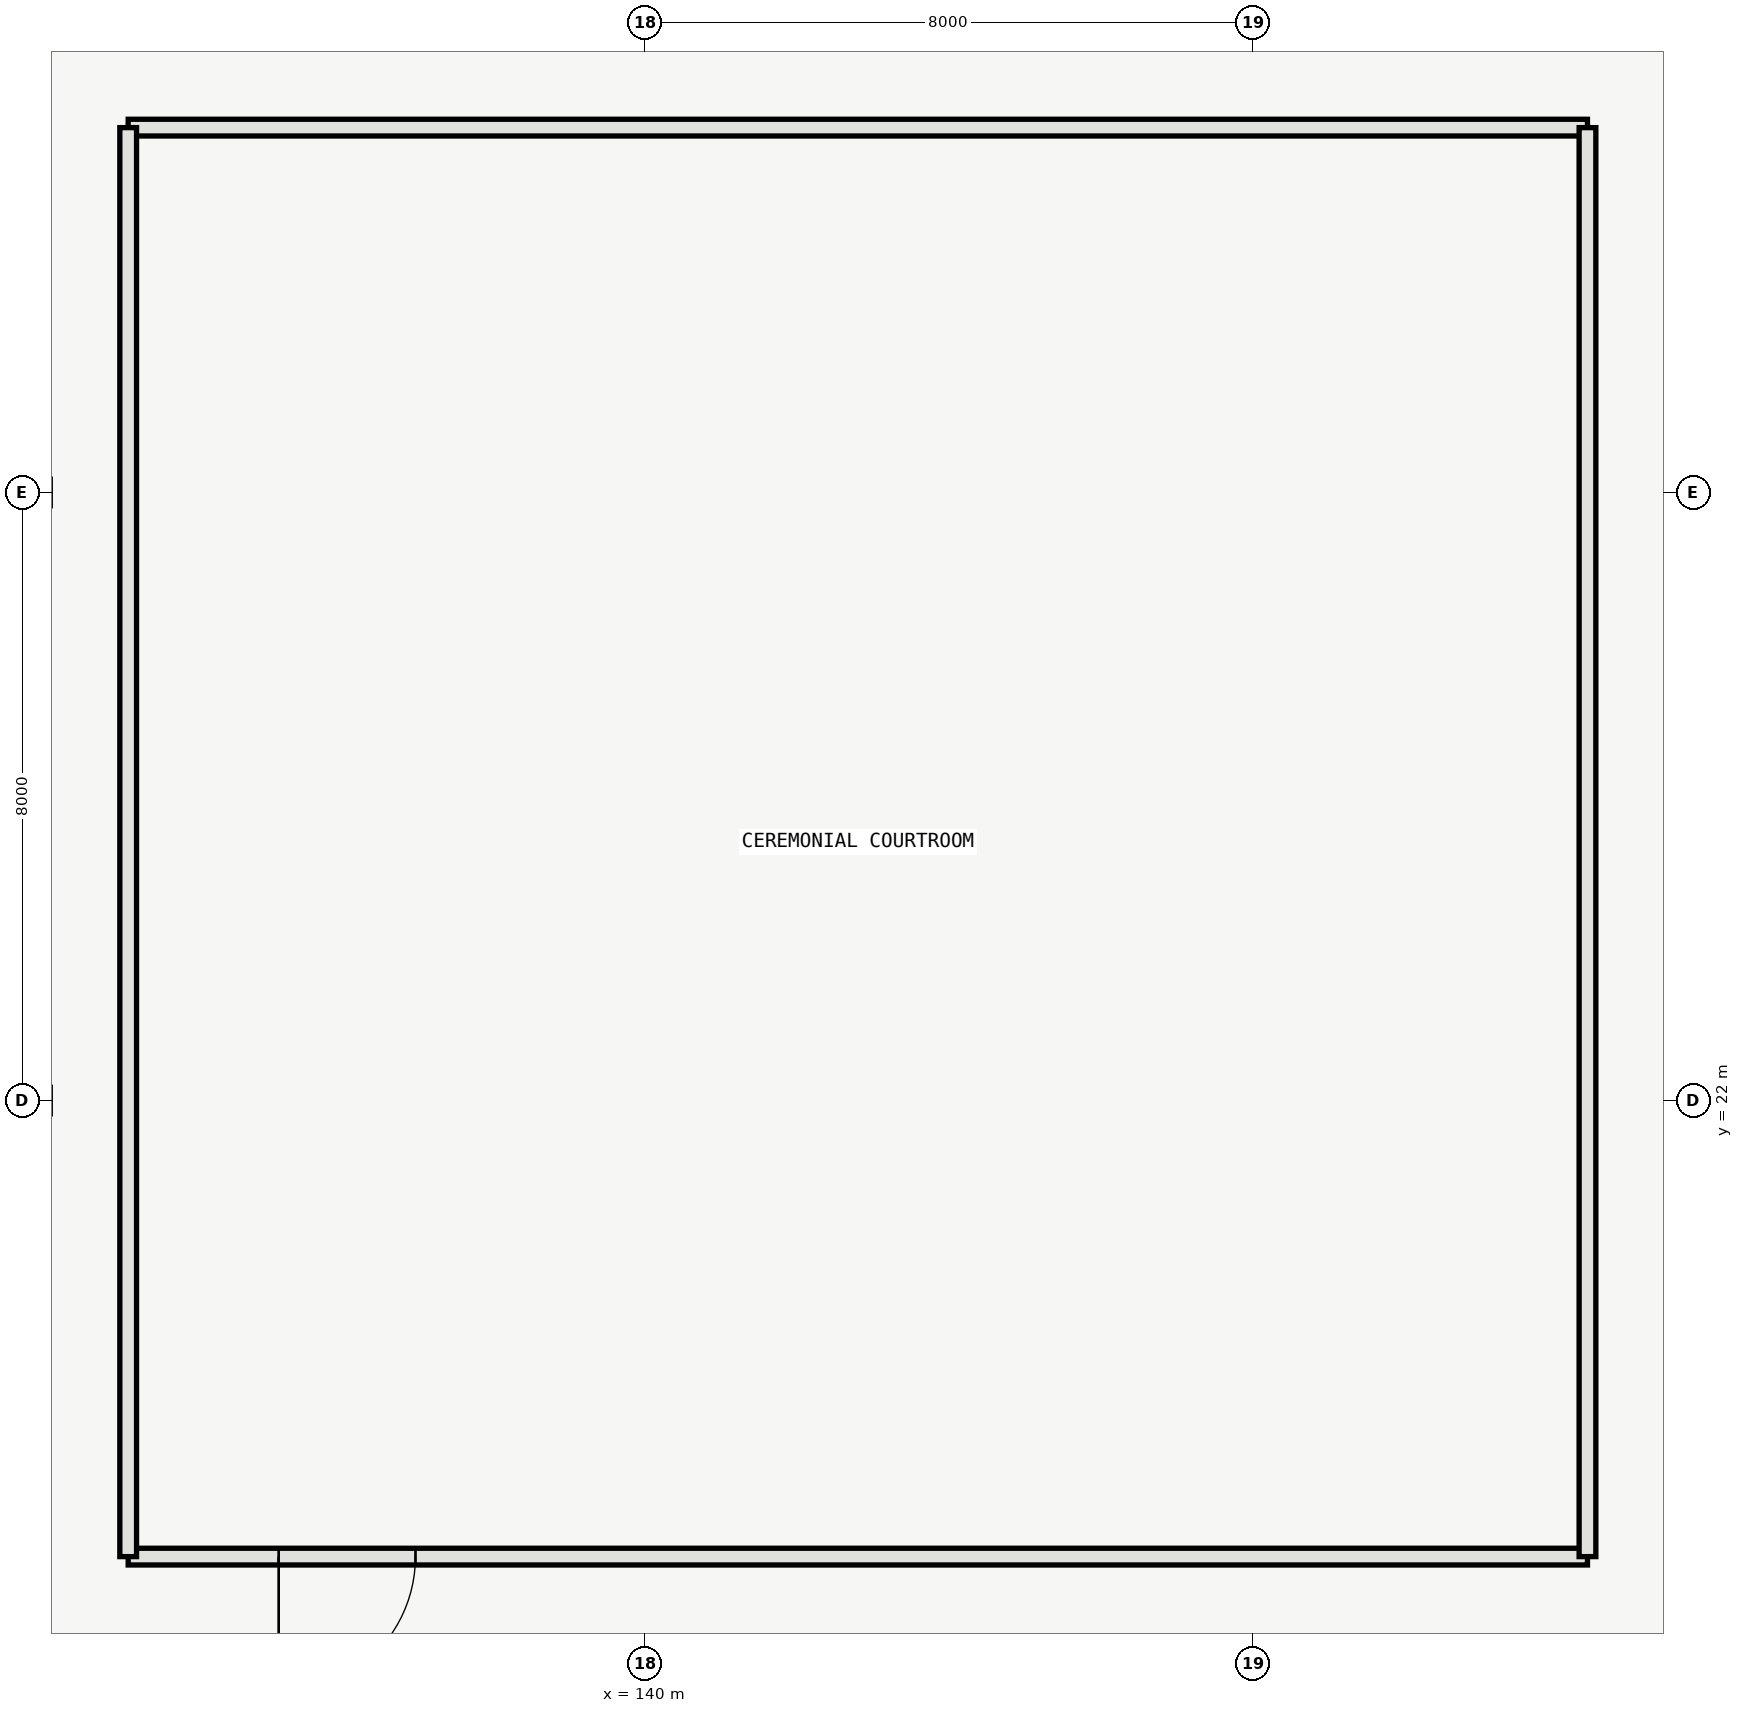
"""IFC4 building model, lengths in metres.
Left out: names, types, materials, properties, quantities, classifications, styles, units other than length and angle.
Written with IfcOpenShell. Run it as: python <this file> out.ifc"""

import sys

from ifc_helpers import new_model, si_unit, direction, frame, frame_2d, origin, place, context, subcontext, project, spatial, rectangle, extrude, element, fill, save


model = new_model("IFC4")
c1 = context("Model", 3, precision=1e-05, world=origin(), true_north=direction((0.0, 1.0)))
c2 = subcontext(c1, "Body", "Model", "MODEL_VIEW")
j1 = project(units=[si_unit("LENGTHUNIT", "METRE"), si_unit("PLANEANGLEUNIT", "RADIAN")], contexts=[c1])
p1 = place(None, origin())
s1 = spatial("IfcSite", under=j1, at=p1, CompositionType="ELEMENT")
p2 = place(p1, origin())
s2 = spatial("IfcBuilding", under=s1, at=p2, CompositionType="ELEMENT")
p3 = place(p2, origin())
s3 = spatial("IfcBuildingStorey", under=s2, at=p3, CompositionType="ELEMENT", Elevation=0.0)
p4 = place(p3, frame((133.2, 16.0, 0.0), z_axis=(0.0, 0.0, 1.0), x_axis=(1.0, 0.0, 0.0)))
e1 = element("IfcWall", 1, at=p4, inside=s3, PredefinedType="PARTITIONING", context=c2, shape_type="SweptSolid", body=[
    extrude(rectangle(XDim=19.2, YDim=0.22, at=frame_2d((9.6, 0.0))), origin(), (0.0, 0.0, 1.0), 5.12),
])
p5 = place(p4, frame((1.98, 0.0, 0.0)))
e2 = element("IfcOpeningElement", 2, at=p5, cuts=e1, PredefinedType="OPENING", context=c2, shape_type="SweptSolid", body=[
    extrude(rectangle(XDim=1.8, YDim=2.4, at=frame_2d((0.9, 1.2))), frame((0.0, 0.12, 0.0), z_axis=(0.0, -1.0, 0.0), x_axis=(1.0, 0.0, 0.0)), (0.0, 0.0, 1.0), 0.24),
])
p6 = place(p3, frame((152.4, 34.8, 0.0), z_axis=(0.0, 0.0, 1.0), x_axis=(-1.0, 0.0, 0.0)))
e3 = element("IfcWall", 3, at=p6, inside=s3, PredefinedType="PARTITIONING", context=c2, shape_type="SweptSolid", body=[
    extrude(rectangle(XDim=19.2, YDim=0.22, at=frame_2d((9.6, 0.0))), origin(), (0.0, 0.0, 1.0), 5.12),
])
for number, where, z_axis, x_axis in (
    (4, (133.2, 34.8, 0.0), (0.0, 0.0, 1.0), (0.0, -1.0, 0.0)),
    (5, (152.4, 16.0, 0.0), (0.0, 0.0, 1.0), (0.0, 1.0, 0.0)),
):
    element("IfcWall", number, at=place(p3, frame(where, z_axis=z_axis, x_axis=x_axis)), inside=s3, PredefinedType="PARTITIONING", context=c2, shape_type="SweptSolid", body=[
        extrude(rectangle(XDim=18.8, YDim=0.22, at=frame_2d((9.4, 0.0))), origin(), (0.0, 0.0, 1.0), 5.12),
    ])
p7 = place(p5, origin())
e6 = element("IfcDoor", 6, at=p7, inside=s3, OperationType="DOUBLE_DOOR_SINGLE_SWING", PredefinedType="DOOR", context=c2, shape_type="SweptSolid", body=[
    extrude(rectangle(XDim=1.8, YDim=2.4, at=frame_2d((0.9, 1.2))), frame((0.0, 0.025, 0.0), z_axis=(0.0, -1.0, 0.0), x_axis=(1.0, 0.0, 0.0)), (0.0, 0.0, 1.0), 0.05),
])
fill(e2, e6)
save(model, sys.argv[1])
